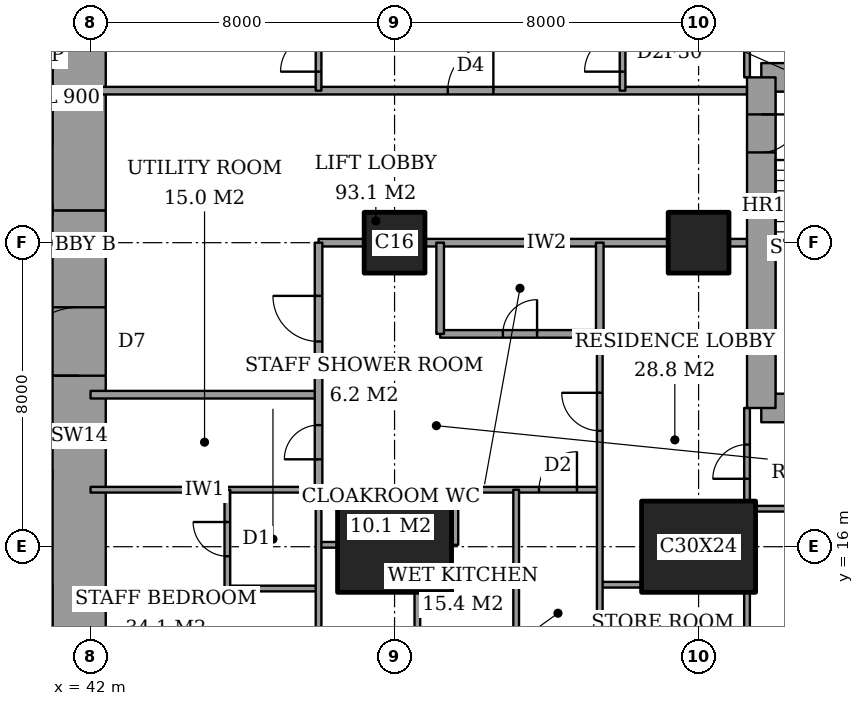
"""IFC4 building model, lengths in metres.
Left out: names, types, materials, properties, quantities, classifications, styles, units other than length and angle.
Written with IfcOpenShell. Run it as: python <this file> out.ifc"""

import sys

from ifc_helpers import new_model, si_unit, direction, frame, frame_2d, origin, origin_2d, place, context, subcontext, project, spatial, rectangle, extrude, element, fill, save


model = new_model("IFC4")
c1 = context("Model", 3, precision=1e-05, world=origin(), true_north=direction((0.0, 1.0)))
c2 = subcontext(c1, "Body", "Model", "MODEL_VIEW")
j1 = project(units=[si_unit("LENGTHUNIT", "METRE"), si_unit("PLANEANGLEUNIT", "RADIAN")], contexts=[c1])
p1 = place(None, origin())
s1 = spatial("IfcSite", under=j1, at=p1, CompositionType="ELEMENT")
p2 = place(p1, origin())
s2 = spatial("IfcBuilding", under=s1, at=p2, CompositionType="ELEMENT")
p3 = place(p2, frame((0.0, 0.0, 237.6)))
s3 = spatial("IfcBuildingStorey", under=s2, at=p3, CompositionType="ELEMENT", Elevation=237.6)
p4 = place(p3, frame((50.0, 16.0, 0.0), z_axis=(0.0, 0.0, 1.0), x_axis=(1.0, 0.0, 0.0)))
e1 = element("IfcColumn", 1, at=p4, inside=s3, PredefinedType="COLUMN", context=c2, shape_type="SweptSolid", body=[
    extrude(rectangle(XDim=3.0, YDim=2.4, at=origin_2d()), origin(), (0.0, 0.0, 1.0), 3.6),
])
p5 = place(p3, frame((50.0, 24.0, 0.0), z_axis=(0.0, 0.0, 1.0), x_axis=(1.0, 0.0, 0.0)))
e2 = element("IfcColumn", 2, at=p5, inside=s3, PredefinedType="COLUMN", context=c2, shape_type="SweptSolid", body=[
    extrude(rectangle(XDim=1.6, YDim=1.6, at=origin_2d()), origin(), (0.0, 0.0, 1.0), 3.6),
])
p6 = place(p3, frame((58.0, 16.0, 0.0), z_axis=(0.0, 0.0, 1.0), x_axis=(1.0, 0.0, 0.0)))
e3 = element("IfcColumn", 3, at=p6, inside=s3, PredefinedType="COLUMN", context=c2, shape_type="SweptSolid", body=[
    extrude(rectangle(XDim=3.0, YDim=2.4, at=origin_2d()), origin(), (0.0, 0.0, 1.0), 3.6),
])
p7 = place(p3, frame((58.0, 24.0, 0.0), z_axis=(0.0, 0.0, 1.0), x_axis=(1.0, 0.0, 0.0)))
e4 = element("IfcColumn", 4, at=p7, inside=s3, PredefinedType="COLUMN", context=c2, shape_type="SweptSolid", body=[
    extrude(rectangle(XDim=1.6, YDim=1.6, at=origin_2d()), origin(), (0.0, 0.0, 1.0), 3.6),
])
p8 = place(p3, frame((41.7, 13.0, 0.0), z_axis=(0.0, 0.0, 1.0), x_axis=(0.0, 1.0, 0.0)))
e5 = element("IfcWall", 5, at=p8, inside=s3, PredefinedType="SHEAR", context=c2, shape_type="SweptSolid", body=[
    extrude(rectangle(XDim=11.85, YDim=1.4, at=frame_2d((5.925, 0.0))), origin(), (0.0, 0.0, 1.0), 3.6),
])
p9 = place(p8, frame((7.5, 0.0, 0.0)))
e6 = element("IfcOpeningElement", 6, at=p9, cuts=e5, PredefinedType="OPENING", context=c2, shape_type="SweptSolid", body=[
    extrude(rectangle(XDim=1.8, YDim=2.4, at=frame_2d((0.9, 1.2))), frame((0.0, 0.71, 0.0), z_axis=(0.0, -1.0, 0.0), x_axis=(1.0, 0.0, 0.0)), (0.0, 0.0, 1.0), 1.42),
])
p10 = place(p3, frame((41.7, 24.85, 0.0), z_axis=(0.0, 0.0, 1.0), x_axis=(0.0, 1.0, 0.0)))
e7 = element("IfcWall", 7, at=p10, inside=s3, PredefinedType="SHEAR", context=c2, shape_type="SweptSolid", body=[
    extrude(rectangle(XDim=10.15, YDim=1.4, at=frame_2d((5.075, 0.0))), origin(), (0.0, 0.0, 1.0), 3.6),
])
for number, where, z_axis, x_axis in (
    (8, (59.65, 19.65, 0.0), (0.0, 0.0, 1.0), (1.0, 0.0, 0.0)),
    (9, (64.1, 28.35, 0.0), (0.0, 0.0, 1.0), (-1.0, 0.0, 0.0)),
):
    element("IfcWall", number, at=place(p3, frame(where, z_axis=z_axis, x_axis=x_axis)), inside=s3, PredefinedType="SHEAR", context=c2, shape_type="SweptSolid", body=[
        extrude(rectangle(XDim=4.45, YDim=0.75, at=frame_2d((2.225, 0.0))), origin(), (0.0, 0.0, 1.0), 3.6),
    ])
p11 = place(p3, frame((59.65, 28.35, 0.0), z_axis=(0.0, 0.0, 1.0), x_axis=(0.0, -1.0, 0.0)))
e10 = element("IfcWall", 10, at=p11, inside=s3, PredefinedType="SHEAR", context=c2, shape_type="SweptSolid", body=[
    extrude(rectangle(XDim=8.7, YDim=0.75, at=frame_2d((4.35, 0.0))), origin(), (0.0, 0.0, 1.0), 3.6),
])
p12 = place(p11, frame((0.975, 0.0, 0.0)))
e11 = element("IfcOpeningElement", 11, at=p12, cuts=e10, PredefinedType="OPENING", context=c2, shape_type="SweptSolid", body=[
    extrude(rectangle(XDim=1.0, YDim=2.1, at=frame_2d((0.5, 1.05))), frame((0.0, 0.385, 0.0), z_axis=(0.0, -1.0, 0.0), x_axis=(1.0, 0.0, 0.0)), (0.0, 0.0, 1.0), 0.77),
])
p13 = place(p3, frame((45.6, 14.9, 0.0), z_axis=(0.0, 0.0, 1.0), x_axis=(1.0, 0.0, 0.0)))
e12 = element("IfcWall", 12, at=p13, inside=s3, PredefinedType="PARTITIONING", context=c2, shape_type="SweptSolid", body=[
    extrude(rectangle(XDim=2.4, YDim=0.15, at=frame_2d((1.2, 0.0))), origin(), (0.0, 0.0, 1.0), 3.35),
])
p14 = place(p3, frame((55.4, 15.0, 0.0), z_axis=(0.0, 0.0, 1.0), x_axis=(1.0, 0.0, 0.0)))
e13 = element("IfcWall", 13, at=p14, inside=s3, PredefinedType="PARTITIONING", context=c2, shape_type="SweptSolid", body=[
    extrude(rectangle(XDim=1.1, YDim=0.15, at=frame_2d((0.55, 0.0))), origin(), (0.0, 0.0, 1.0), 3.35),
])
p15 = place(p3, frame((48.0, 16.05, 0.0), z_axis=(0.0, 0.0, 1.0), x_axis=(1.0, 0.0, 0.0)))
e14 = element("IfcWall", 14, at=p15, inside=s3, PredefinedType="PARTITIONING", context=c2, shape_type="SweptSolid", body=[
    extrude(rectangle(XDim=0.5, YDim=0.15, at=frame_2d((0.25, 0.0))), origin(), (0.0, 0.0, 1.0), 2.634),
])
p16 = place(p3, frame((59.5, 17.0, 0.0), z_axis=(0.0, 0.0, 1.0), x_axis=(1.0, 0.0, 0.0)))
e15 = element("IfcWall", 15, at=p16, inside=s3, PredefinedType="PARTITIONING", context=c2, shape_type="SweptSolid", body=[
    extrude(rectangle(XDim=6.95, YDim=0.15, at=frame_2d((3.475, 0.0))), origin(), (0.0, 0.0, 1.0), 3.35),
])
p17 = place(p3, frame((42.0, 17.5, 0.0), z_axis=(0.0, 0.0, 1.0), x_axis=(1.0, 0.0, 0.0)))
e16 = element("IfcWall", 16, at=p17, inside=s3, PredefinedType="PARTITIONING", context=c2, shape_type="SweptSolid", body=[
    extrude(rectangle(XDim=6.0, YDim=0.15, at=frame_2d((3.0, 0.0))), origin(), (0.0, 0.0, 1.0), 3.35),
])
p18 = place(p3, frame((51.6, 17.5, 0.0), z_axis=(0.0, 0.0, 1.0), x_axis=(1.0, 0.0, 0.0)))
e17 = element("IfcWall", 17, at=p18, inside=s3, PredefinedType="PARTITIONING", context=c2, shape_type="SweptSolid", body=[
    extrude(rectangle(XDim=3.8, YDim=0.15, at=frame_2d((1.9, 0.0))), origin(), (0.0, 0.0, 1.0), 3.35),
])
p19 = place(p18, frame((2.2, 0.0, 0.0)))
e18 = element("IfcOpeningElement", 18, at=p19, cuts=e17, PredefinedType="OPENING", context=c2, shape_type="SweptSolid", body=[
    extrude(rectangle(XDim=1.0, YDim=2.1, at=frame_2d((0.5, 1.05))), frame((0.0, 0.085, 0.0), z_axis=(0.0, -1.0, 0.0), x_axis=(1.0, 0.0, 0.0)), (0.0, 0.0, 1.0), 0.17),
])
p20 = place(p3, frame((42.0, 20.0, 0.0), z_axis=(0.0, 0.0, 1.0), x_axis=(1.0, 0.0, 0.0)))
e19 = element("IfcWall", 19, at=p20, inside=s3, PredefinedType="PARTITIONING", context=c2, shape_type="SweptSolid", body=[
    extrude(rectangle(XDim=6.0, YDim=0.2, at=frame_2d((3.0, 0.0))), origin(), (0.0, 0.0, 1.0), 3.35),
])
p21 = place(p3, frame((51.2, 21.6, 0.0), z_axis=(0.0, 0.0, 1.0), x_axis=(1.0, 0.0, 0.0)))
e20 = element("IfcWall", 20, at=p21, inside=s3, PredefinedType="PARTITIONING", context=c2, shape_type="SweptSolid", body=[
    extrude(rectangle(XDim=4.2, YDim=0.2, at=frame_2d((2.1, 0.0))), origin(), (0.0, 0.0, 1.0), 3.35),
])
p22 = place(p21, frame((1.65, 0.0, 0.0)))
e21 = element("IfcOpeningElement", 21, at=p22, cuts=e20, PredefinedType="OPENING", context=c2, shape_type="SweptSolid", body=[
    extrude(rectangle(XDim=0.9, YDim=2.1, at=frame_2d((0.45, 1.05))), frame((0.0, 0.11, 0.0), z_axis=(0.0, -1.0, 0.0), x_axis=(1.0, 0.0, 0.0)), (0.0, 0.0, 1.0), 0.22),
])
p23 = place(p3, frame((48.0, 24.0, 0.0), z_axis=(0.0, 0.0, 1.0), x_axis=(1.0, 0.0, 0.0)))
e22 = element("IfcWall", 22, at=p23, inside=s3, PredefinedType="PARTITIONING", context=c2, shape_type="SweptSolid", body=[
    extrude(rectangle(XDim=1.2, YDim=0.2, at=frame_2d((0.6, 0.0))), origin(), (0.0, 0.0, 1.0), 3.35),
])
p24 = place(p3, frame((50.8, 24.0, 0.0), z_axis=(0.0, 0.0, 1.0), x_axis=(1.0, 0.0, 0.0)))
e23 = element("IfcWall", 23, at=p24, inside=s3, PredefinedType="PARTITIONING", context=c2, shape_type="SweptSolid", body=[
    extrude(rectangle(XDim=6.4, YDim=0.2, at=frame_2d((3.2, 0.0))), origin(), (0.0, 0.0, 1.0), 3.35),
])
p25 = place(p3, frame((58.8, 24.0, 0.0), z_axis=(0.0, 0.0, 1.0), x_axis=(1.0, 0.0, 0.0)))
e24 = element("IfcWall", 24, at=p25, inside=s3, PredefinedType="PARTITIONING", context=c2, shape_type="SweptSolid", body=[
    extrude(rectangle(XDim=0.475, YDim=0.2, at=frame_2d((0.237, 0.0))), origin(), (0.0, 0.0, 1.0), 3.35),
])
p26 = place(p3, frame((42.0, 28.0, 0.0), z_axis=(0.0, 0.0, 1.0), x_axis=(1.0, 0.0, 0.0)))
e25 = element("IfcWall", 25, at=p26, inside=s3, PredefinedType="PARTITIONING", context=c2, shape_type="SweptSolid", body=[
    extrude(rectangle(XDim=17.275, YDim=0.2, at=frame_2d((8.637, 0.0))), origin(), (0.0, 0.0, 1.0), 3.35),
])
p27 = place(p26, frame((9.4, 0.0, 0.0)))
e26 = element("IfcOpeningElement", 26, at=p27, cuts=e25, PredefinedType="OPENING", context=c2, shape_type="SweptSolid", body=[
    extrude(rectangle(XDim=1.2, YDim=2.4, at=frame_2d((0.6, 1.2))), frame((0.0, 0.11, 0.0), z_axis=(0.0, -1.0, 0.0), x_axis=(1.0, 0.0, 0.0)), (0.0, 0.0, 1.0), 0.22),
])
p28 = place(p3, frame((45.6, 14.9, 0.0), z_axis=(0.0, 0.0, 1.0), x_axis=(0.0, 1.0, 0.0)))
e27 = element("IfcWall", 27, at=p28, inside=s3, PredefinedType="PARTITIONING", context=c2, shape_type="SweptSolid", body=[
    extrude(rectangle(XDim=2.6, YDim=0.15, at=frame_2d((1.3, 0.0))), origin(), (0.0, 0.0, 1.0), 3.35),
])
p29 = place(p28, frame((0.85, 0.0, 0.0)))
e28 = element("IfcOpeningElement", 28, at=p29, cuts=e27, PredefinedType="OPENING", context=c2, shape_type="SweptSolid", body=[
    extrude(rectangle(XDim=0.9, YDim=2.1, at=frame_2d((0.45, 1.05))), frame((0.0, 0.085, 0.0), z_axis=(0.0, -1.0, 0.0), x_axis=(1.0, 0.0, 0.0)), (0.0, 0.0, 1.0), 0.17),
])
p30 = place(p3, frame((48.0, 17.5, 0.0), z_axis=(0.0, 0.0, 1.0), x_axis=(0.0, 1.0, 0.0)))
e29 = element("IfcWall", 29, at=p30, inside=s3, PredefinedType="PARTITIONING", context=c2, shape_type="SweptSolid", body=[
    extrude(rectangle(XDim=6.5, YDim=0.2, at=frame_2d((3.25, 0.0))), origin(), (0.0, 0.0, 1.0), 3.35),
])
p31 = place(p30, frame((3.9, 0.0, 0.0)))
e30 = element("IfcOpeningElement", 30, at=p31, cuts=e29, PredefinedType="OPENING", context=c2, shape_type="SweptSolid", body=[
    extrude(rectangle(XDim=1.2, YDim=2.4, at=frame_2d((0.6, 1.2))), frame((0.0, 0.11, 0.0), z_axis=(0.0, -1.0, 0.0), x_axis=(1.0, 0.0, 0.0)), (0.0, 0.0, 1.0), 0.22),
])
p32 = place(p30, frame((0.8, 0.0, 0.0)))
e31 = element("IfcOpeningElement", 31, at=p32, cuts=e29, PredefinedType="OPENING", context=c2, shape_type="SweptSolid", body=[
    extrude(rectangle(XDim=0.9, YDim=2.1, at=frame_2d((0.45, 1.05))), frame((0.0, 0.11, 0.0), z_axis=(0.0, -1.0, 0.0), x_axis=(1.0, 0.0, 0.0)), (0.0, 0.0, 1.0), 0.22),
])
p33 = place(p3, frame((48.0, 11.0, 0.0), z_axis=(0.0, 0.0, 1.0), x_axis=(0.0, 1.0, 0.0)))
e32 = element("IfcWall", 32, at=p33, inside=s3, PredefinedType="PARTITIONING", context=c2, shape_type="SweptSolid", body=[
    extrude(rectangle(XDim=6.5, YDim=0.15, at=frame_2d((3.25, 0.0))), origin(), (0.0, 0.0, 1.0), 3.35),
])
p34 = place(p3, frame((48.0, 28.0, 0.0), z_axis=(0.0, 0.0, 1.0), x_axis=(0.0, 1.0, 0.0)))
e33 = element("IfcWall", 33, at=p34, inside=s3, PredefinedType="PARTITIONING", context=c2, shape_type="SweptSolid", body=[
    extrude(rectangle(XDim=9.4, YDim=0.15, at=frame_2d((4.7, 0.0))), origin(), (0.0, 0.0, 1.0), 3.35),
])
p35 = place(p34, frame((0.5, 0.0, 0.0)))
e34 = element("IfcOpeningElement", 34, at=p35, cuts=e33, PredefinedType="OPENING", context=c2, shape_type="SweptSolid", body=[
    extrude(rectangle(XDim=1.0, YDim=2.1, at=frame_2d((0.5, 1.05))), frame((0.0, 0.085, 0.0), z_axis=(0.0, -1.0, 0.0), x_axis=(1.0, 0.0, 0.0)), (0.0, 0.0, 1.0), 0.17),
])
p36 = place(p3, frame((50.6, 11.0, 0.0), z_axis=(0.0, 0.0, 1.0), x_axis=(0.0, 1.0, 0.0)))
e35 = element("IfcWall", 35, at=p36, inside=s3, PredefinedType="PARTITIONING", context=c2, shape_type="SweptSolid", body=[
    extrude(rectangle(XDim=3.8, YDim=0.15, at=frame_2d((1.9, 0.0))), origin(), (0.0, 0.0, 1.0), 3.35),
])
p37 = place(p3, frame((51.2, 21.6, 0.0), z_axis=(0.0, 0.0, 1.0), x_axis=(0.0, 1.0, 0.0)))
e36 = element("IfcWall", 36, at=p37, inside=s3, PredefinedType="PARTITIONING", context=c2, shape_type="SweptSolid", body=[
    extrude(rectangle(XDim=2.4, YDim=0.2, at=frame_2d((1.2, 0.0))), origin(), (0.0, 0.0, 1.0), 3.35),
])
p38 = place(p3, frame((51.6, 16.05, 0.0), z_axis=(0.0, 0.0, 1.0), x_axis=(0.0, 1.0, 0.0)))
e37 = element("IfcWall", 37, at=p38, inside=s3, PredefinedType="PARTITIONING", context=c2, shape_type="SweptSolid", body=[
    extrude(rectangle(XDim=1.45, YDim=0.15, at=frame_2d((0.725, 0.0))), origin(), (0.0, 0.0, 1.0), 3.35),
])
p39 = place(p3, frame((53.2, 11.0, 0.0), z_axis=(0.0, 0.0, 1.0), x_axis=(0.0, 1.0, 0.0)))
e38 = element("IfcWall", 38, at=p39, inside=s3, PredefinedType="PARTITIONING", context=c2, shape_type="SweptSolid", body=[
    extrude(rectangle(XDim=6.5, YDim=0.15, at=frame_2d((3.25, 0.0))), origin(), (0.0, 0.0, 1.0), 3.35),
])
p40 = place(p3, frame((55.4, 21.6, 0.0), z_axis=(0.0, 0.0, 1.0), x_axis=(0.0, 1.0, 0.0)))
e39 = element("IfcWall", 39, at=p40, inside=s3, PredefinedType="PARTITIONING", context=c2, shape_type="SweptSolid", body=[
    extrude(rectangle(XDim=2.4, YDim=0.2, at=frame_2d((1.2, 0.0))), origin(), (0.0, 0.0, 1.0), 3.35),
])
p41 = place(p3, frame((55.4, 11.0, 0.0), z_axis=(0.0, 0.0, 1.0), x_axis=(0.0, 1.0, 0.0)))
e40 = element("IfcWall", 40, at=p41, inside=s3, PredefinedType="PARTITIONING", context=c2, shape_type="SweptSolid", body=[
    extrude(rectangle(XDim=10.6, YDim=0.15, at=frame_2d((5.3, 0.0))), origin(), (0.0, 0.0, 1.0), 3.35),
])
p42 = place(p41, frame((8.05, 0.0, 0.0)))
e41 = element("IfcOpeningElement", 41, at=p42, cuts=e40, PredefinedType="OPENING", context=c2, shape_type="SweptSolid", body=[
    extrude(rectangle(XDim=1.0, YDim=2.1, at=frame_2d((0.5, 1.05))), frame((0.0, 0.085, 0.0), z_axis=(0.0, -1.0, 0.0), x_axis=(1.0, 0.0, 0.0)), (0.0, 0.0, 1.0), 0.17),
])
p43 = place(p3, frame((56.0, 28.0, 0.0), z_axis=(0.0, 0.0, 1.0), x_axis=(0.0, 1.0, 0.0)))
e42 = element("IfcWall", 42, at=p43, inside=s3, PredefinedType="PARTITIONING", context=c2, shape_type="SweptSolid", body=[
    extrude(rectangle(XDim=9.4, YDim=0.15, at=frame_2d((4.7, 0.0))), origin(), (0.0, 0.0, 1.0), 3.35),
])
p44 = place(p43, frame((0.5, 0.0, 0.0)))
e43 = element("IfcOpeningElement", 43, at=p44, cuts=e42, PredefinedType="OPENING", context=c2, shape_type="SweptSolid", body=[
    extrude(rectangle(XDim=1.0, YDim=2.1, at=frame_2d((0.5, 1.05))), frame((0.0, 0.085, 0.0), z_axis=(0.0, -1.0, 0.0), x_axis=(1.0, 0.0, 0.0)), (0.0, 0.0, 1.0), 0.17),
])
p45 = place(p3, frame((59.275, 11.0, 0.0), z_axis=(0.0, 0.0, 1.0), x_axis=(0.0, 1.0, 0.0)))
e44 = element("IfcWall", 44, at=p45, inside=s3, PredefinedType="PARTITIONING", context=c2, shape_type="SweptSolid", body=[
    extrude(rectangle(XDim=3.8, YDim=0.15, at=frame_2d((1.9, 0.0))), origin(), (0.0, 0.0, 1.0), 3.35),
])
p46 = place(p3, frame((59.275, 17.2, 0.0), z_axis=(0.0, 0.0, 1.0), x_axis=(0.0, 1.0, 0.0)))
e45 = element("IfcWall", 45, at=p46, inside=s3, PredefinedType="PARTITIONING", context=c2, shape_type="SweptSolid", body=[
    extrude(rectangle(XDim=2.45, YDim=0.15, at=frame_2d((1.225, 0.0))), origin(), (0.0, 0.0, 1.0), 3.35),
])
p47 = place(p46, frame((0.587, 0.0, 0.0)))
e46 = element("IfcOpeningElement", 46, at=p47, cuts=e45, PredefinedType="OPENING", context=c2, shape_type="SweptSolid", body=[
    extrude(rectangle(XDim=0.9, YDim=2.1, at=frame_2d((0.45, 1.05))), frame((0.0, 0.085, 0.0), z_axis=(0.0, -1.0, 0.0), x_axis=(1.0, 0.0, 0.0)), (0.0, 0.0, 1.0), 0.17),
])
p48 = place(p3, frame((59.275, 28.35, 0.0), z_axis=(0.0, 0.0, 1.0), x_axis=(0.0, 1.0, 0.0)))
e47 = element("IfcWall", 47, at=p48, inside=s3, PredefinedType="PARTITIONING", context=c2, shape_type="SweptSolid", body=[
    extrude(rectangle(XDim=2.45, YDim=0.15, at=frame_2d((1.225, 0.0))), origin(), (0.0, 0.0, 1.0), 3.35),
])
p49 = place(p48, frame((0.962, 0.0, 0.0)))
e48 = element("IfcOpeningElement", 48, at=p49, cuts=e47, PredefinedType="OPENING", context=c2, shape_type="SweptSolid", body=[
    extrude(rectangle(XDim=0.9, YDim=2.1, at=frame_2d((0.45, 1.05))), frame((0.0, 0.085, 0.0), z_axis=(0.0, -1.0, 0.0), x_axis=(1.0, 0.0, 0.0)), (0.0, 0.0, 1.0), 0.17),
])
p50 = place(p3, frame((28.3, 17.9, 0.0), z_axis=(0.0, 0.0, 1.0), x_axis=(1.0, 0.0, 0.0)))
e49 = element("IfcWall", 49, at=p50, inside=s3, PredefinedType="PARTITIONING", context=c2, shape_type="SweptSolid", body=[
    extrude(rectangle(XDim=12.7, YDim=0.2, at=frame_2d((6.35, 0.0))), origin(), (0.0, 0.0, 1.0), 3.6),
])
p51 = place(p50, frame((1.05, 0.0, 0.0)))
e50 = element("IfcOpeningElement", 50, at=p51, cuts=e49, PredefinedType="OPENING", context=c2, shape_type="SweptSolid", body=[
    extrude(rectangle(XDim=0.9, YDim=2.1, at=frame_2d((0.45, 1.05))), frame((0.0, 0.11, 0.0), z_axis=(0.0, -1.0, 0.0), x_axis=(1.0, 0.0, 0.0)), (0.0, 0.0, 1.0), 0.22),
])
p52 = place(p50, frame((4.25, 0.0, 0.0)))
e51 = element("IfcOpeningElement", 51, at=p52, cuts=e49, PredefinedType="OPENING", context=c2, shape_type="SweptSolid", body=[
    extrude(rectangle(XDim=0.9, YDim=2.1, at=frame_2d((0.45, 1.05))), frame((0.0, 0.11, 0.0), z_axis=(0.0, -1.0, 0.0), x_axis=(1.0, 0.0, 0.0)), (0.0, 0.0, 1.0), 0.22),
])
p53 = place(p50, frame((10.6, 0.0, 0.0)))
e52 = element("IfcOpeningElement", 52, at=p53, cuts=e49, PredefinedType="OPENING", context=c2, shape_type="SweptSolid", body=[
    extrude(rectangle(XDim=1.2, YDim=2.1, at=frame_2d((0.6, 1.05))), frame((0.0, 0.11, 0.0), z_axis=(0.0, -1.0, 0.0), x_axis=(1.0, 0.0, 0.0)), (0.0, 0.0, 1.0), 0.22),
])
p54 = place(p47, origin())
e53 = element("IfcDoor", 53, at=p54, inside=s3, OperationType="SINGLE_SWING_RIGHT", PredefinedType="DOOR", context=c2, shape_type="SweptSolid", body=[
    extrude(rectangle(XDim=0.9, YDim=2.1, at=frame_2d((0.45, 1.05))), frame((0.0, 0.025, 0.0), z_axis=(0.0, -1.0, 0.0), x_axis=(1.0, 0.0, 0.0)), (0.0, 0.0, 1.0), 0.05),
])
fill(e46, e53)
p55 = place(p42, origin())
e54 = element("IfcDoor", 54, at=p55, inside=s3, OperationType="SINGLE_SWING_LEFT", PredefinedType="DOOR", context=c2, shape_type="SweptSolid", body=[
    extrude(rectangle(XDim=1.0, YDim=2.1, at=frame_2d((0.5, 1.05))), frame((0.0, 0.025, 0.0), z_axis=(0.0, -1.0, 0.0), x_axis=(1.0, 0.0, 0.0)), (0.0, 0.0, 1.0), 0.05),
])
fill(e41, e54)
p56 = place(p22, origin())
e55 = element("IfcDoor", 55, at=p56, inside=s3, OperationType="SINGLE_SWING_LEFT", PredefinedType="DOOR", context=c2, shape_type="SweptSolid", body=[
    extrude(rectangle(XDim=0.9, YDim=2.1, at=frame_2d((0.45, 1.05))), frame((0.0, 0.025, 0.0), z_axis=(0.0, -1.0, 0.0), x_axis=(1.0, 0.0, 0.0)), (0.0, 0.0, 1.0), 0.05),
])
fill(e21, e55)
p57 = place(p31, origin())
e56 = element("IfcDoor", 56, at=p57, inside=s3, OperationType="SINGLE_SWING_LEFT", PredefinedType="DOOR", context=c2, shape_type="SweptSolid", body=[
    extrude(rectangle(XDim=1.2, YDim=2.4, at=frame_2d((0.6, 1.2))), frame((0.0, 0.025, 0.0), z_axis=(0.0, -1.0, 0.0), x_axis=(1.0, 0.0, 0.0)), (0.0, 0.0, 1.0), 0.05),
])
fill(e30, e56)
p58 = place(p19, origin())
e57 = element("IfcDoor", 57, at=p58, inside=s3, OperationType="SINGLE_SWING_LEFT", PredefinedType="DOOR", context=c2, shape_type="SweptSolid", body=[
    extrude(rectangle(XDim=1.0, YDim=2.1, at=frame_2d((0.5, 1.05))), frame((0.0, 0.025, 0.0), z_axis=(0.0, -1.0, 0.0), x_axis=(1.0, 0.0, 0.0)), (0.0, 0.0, 1.0), 0.05),
])
fill(e18, e57)
p59 = place(p29, origin())
e58 = element("IfcDoor", 58, at=p59, inside=s3, OperationType="SINGLE_SWING_LEFT", PredefinedType="DOOR", context=c2, shape_type="SweptSolid", body=[
    extrude(rectangle(XDim=0.9, YDim=2.1, at=frame_2d((0.45, 1.05))), frame((0.0, 0.025, 0.0), z_axis=(0.0, -1.0, 0.0), x_axis=(1.0, 0.0, 0.0)), (0.0, 0.0, 1.0), 0.05),
])
fill(e28, e58)
p60 = place(p32, origin())
e59 = element("IfcDoor", 59, at=p60, inside=s3, OperationType="SINGLE_SWING_RIGHT", PredefinedType="DOOR", context=c2, shape_type="SweptSolid", body=[
    extrude(rectangle(XDim=0.9, YDim=2.1, at=frame_2d((0.45, 1.05))), frame((0.0, 0.025, 0.0), z_axis=(0.0, -1.0, 0.0), x_axis=(1.0, 0.0, 0.0)), (0.0, 0.0, 1.0), 0.05),
])
fill(e31, e59)
p61 = place(p44, origin())
e60 = element("IfcDoor", 60, at=p61, inside=s3, OperationType="SINGLE_SWING_RIGHT", PredefinedType="DOOR", context=c2, shape_type="SweptSolid", body=[
    extrude(rectangle(XDim=1.0, YDim=2.1, at=frame_2d((0.5, 1.05))), frame((0.0, 0.025, 0.0), z_axis=(0.0, -1.0, 0.0), x_axis=(1.0, 0.0, 0.0)), (0.0, 0.0, 1.0), 0.05),
])
fill(e43, e60)
p62 = place(p27, origin())
e61 = element("IfcDoor", 61, at=p62, inside=s3, OperationType="SINGLE_SWING_LEFT", PredefinedType="DOOR", context=c2, shape_type="SweptSolid", body=[
    extrude(rectangle(XDim=1.2, YDim=2.4, at=frame_2d((0.6, 1.2))), frame((0.0, 0.025, 0.0), z_axis=(0.0, -1.0, 0.0), x_axis=(1.0, 0.0, 0.0)), (0.0, 0.0, 1.0), 0.05),
])
fill(e26, e61)
p63 = place(p35, origin())
e62 = element("IfcDoor", 62, at=p63, inside=s3, OperationType="SINGLE_SWING_RIGHT", PredefinedType="DOOR", context=c2, shape_type="SweptSolid", body=[
    extrude(rectangle(XDim=1.0, YDim=2.1, at=frame_2d((0.5, 1.05))), frame((0.0, 0.025, 0.0), z_axis=(0.0, -1.0, 0.0), x_axis=(1.0, 0.0, 0.0)), (0.0, 0.0, 1.0), 0.05),
])
fill(e34, e62)
p64 = place(p9, origin())
e63 = element("IfcDoor", 63, at=p64, inside=s3, OperationType="DOUBLE_DOOR_DOUBLE_SWING", PredefinedType="DOOR", context=c2, shape_type="SweptSolid", body=[
    extrude(rectangle(XDim=1.8, YDim=2.4, at=frame_2d((0.9, 1.2))), frame((0.0, 0.025, 0.0), z_axis=(0.0, -1.0, 0.0), x_axis=(1.0, 0.0, 0.0)), (0.0, 0.0, 1.0), 0.05),
])
fill(e6, e63)
p65 = place(p12, origin())
e64 = element("IfcDoor", 64, at=p65, inside=s3, OperationType="SINGLE_SWING_RIGHT", PredefinedType="DOOR", context=c2, shape_type="SweptSolid", body=[
    extrude(rectangle(XDim=1.0, YDim=2.1, at=frame_2d((0.5, 1.05))), frame((0.0, 0.025, 0.0), z_axis=(0.0, -1.0, 0.0), x_axis=(1.0, 0.0, 0.0)), (0.0, 0.0, 1.0), 0.05),
])
fill(e11, e64)
save(model, sys.argv[1])
